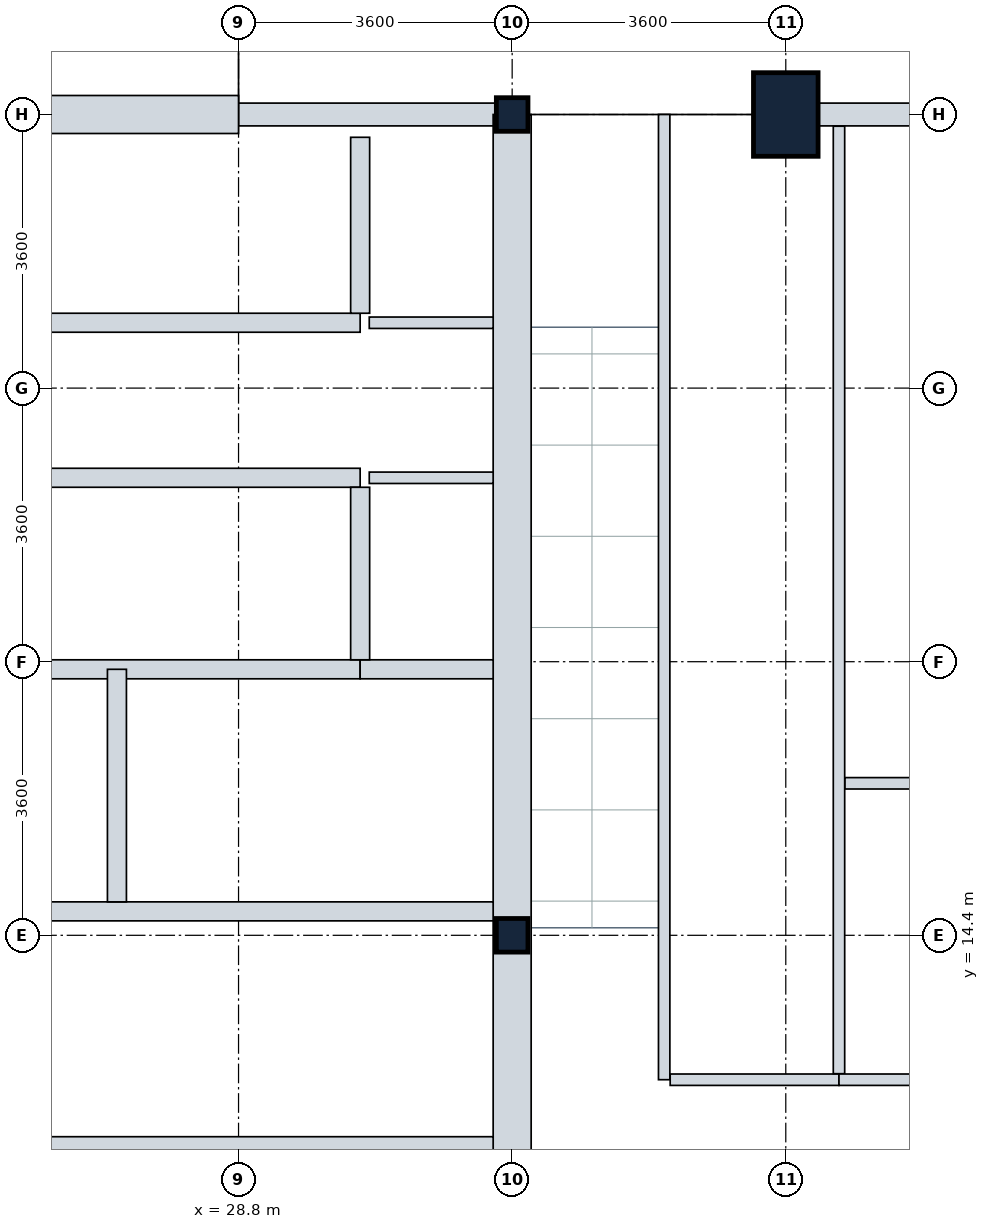
"""IFC4 building model, lengths in metres.
Left out: names, types, materials, properties, quantities, classifications, styles, units other than length and angle.
Written with IfcOpenShell. Run it as: python <this file> out.ifc"""

import sys

from ifc_helpers import new_model, si_unit, direction, frame, frame_2d, origin, origin_2d, place, context, subcontext, project, spatial, rectangle, i_section, extrude, element, fill, save


model = new_model("IFC4")
c1 = context("Model", 3, precision=1e-05, world=origin(), true_north=direction((0.0, 1.0)))
c2 = subcontext(c1, "Body", "Model", "MODEL_VIEW")
j1 = project(units=[si_unit("LENGTHUNIT", "METRE"), si_unit("PLANEANGLEUNIT", "RADIAN")], contexts=[c1])
p1 = place(None, origin())
s1 = spatial("IfcSite", under=j1, at=p1, CompositionType="ELEMENT")
p2 = place(p1, origin())
s2 = spatial("IfcBuilding", under=s1, at=p2, CompositionType="ELEMENT")
p3 = place(p2, frame((0.0, 0.0, 115.2)))
s3 = spatial("IfcBuildingStorey", under=s2, at=p3, CompositionType="ELEMENT", Elevation=115.2)
for number, where, z_axis, x_axis in (
    (1, (32.4, 14.4, 0.0), (0.0, 0.0, 1.0), (1.0, 0.0, 0.0)),
    (2, (32.4, 25.2, 0.0), (0.0, 0.0, 1.0), (1.0, 0.0, 0.0)),
):
    element("IfcColumn", number, at=place(p3, frame(where, z_axis=z_axis, x_axis=x_axis)), inside=s3, PredefinedType="COLUMN", context=c2, shape_type="SweptSolid", body=[
        extrude(i_section(OverallWidth=0.416, OverallDepth=0.442, WebThickness=0.025, FlangeThickness=0.041, FilletRadius=0.015, at=origin_2d()), origin(), (0.0, 0.0, 1.0), 4.8),
    ])
p4 = place(p3, frame((36.0, 25.2, 0.0), z_axis=(0.0, 0.0, 1.0), x_axis=(1.0, 0.0, 0.0)))
e3 = element("IfcColumn", 3, at=p4, inside=s3, PredefinedType="COLUMN", context=c2, shape_type="SweptSolid", body=[
    extrude(rectangle(XDim=0.85, YDim=1.1, at=origin_2d()), origin(), (0.0, 0.0, 1.0), 4.8),
])
p5 = place(p3, frame((36.0, 25.2, 0.0), z_axis=(0.0, 0.0, 1.0), x_axis=(1.0, 0.0, 0.0)))
e4 = element("IfcWall", 4, at=p5, inside=s3, PredefinedType="STANDARD", context=c2, shape_type="SweptSolid", body=[
    extrude(rectangle(XDim=3.6, YDim=0.3, at=frame_2d((1.8, 0.0))), origin(), (0.0, 0.0, 1.0), 3.93),
])
p6 = place(p3, frame((28.8, 25.2, 0.0), z_axis=(0.0, 0.0, 1.0), x_axis=(1.0, 0.0, 0.0)))
e5 = element("IfcWall", 5, at=p6, inside=s3, PredefinedType="STANDARD", context=c2, shape_type="SweptSolid", body=[
    extrude(rectangle(XDim=3.6, YDim=0.3, at=frame_2d((1.8, 0.0))), origin(), (0.0, 0.0, 1.0), 4.535),
])
p7 = place(p6, frame((0.728, 0.0, 0.85)))
e6 = element("IfcOpeningElement", 6, at=p7, cuts=e5, PredefinedType="OPENING", context=c2, shape_type="SweptSolid", body=[
    extrude(rectangle(XDim=2.1, YDim=1.35, at=frame_2d((1.05, 0.675))), frame((0.0, 0.16, 0.0), z_axis=(0.0, -1.0, 0.0), x_axis=(1.0, 0.0, 0.0)), (0.0, 0.0, 1.0), 0.32),
])
p8 = place(p3, frame((14.4, 25.2, 0.0), z_axis=(0.0, 0.0, 1.0), x_axis=(1.0, 0.0, 0.0)))
e7 = element("IfcWall", 7, at=p8, inside=s3, PredefinedType="SHEAR", context=c2, shape_type="SweptSolid", body=[
    extrude(rectangle(XDim=14.4, YDim=0.5, at=frame_2d((7.2, 0.0))), origin(), (0.0, 0.0, 1.0), 4.55),
])
p9 = place(p3, frame((32.4, 10.8, 0.0), z_axis=(0.0, 0.0, 1.0), x_axis=(0.0, 1.0, 0.0)))
e8 = element("IfcWall", 8, at=p9, inside=s3, PredefinedType="SHEAR", context=c2, shape_type="SweptSolid", body=[
    extrude(rectangle(XDim=14.4, YDim=0.5, at=frame_2d((7.2, 0.0))), origin(), (0.0, 0.0, 1.0), 4.55),
])
p10 = place(p9, frame((4.35, 0.0, 0.0)))
e9 = element("IfcOpeningElement", 9, at=p10, cuts=e8, PredefinedType="OPENING", context=c2, shape_type="SweptSolid", body=[
    extrude(rectangle(XDim=1.2, YDim=2.1, at=frame_2d((0.6, 1.05))), frame((0.0, 0.26, 0.0), z_axis=(0.0, -1.0, 0.0), x_axis=(1.0, 0.0, 0.0)), (0.0, 0.0, 1.0), 0.52),
])
p11 = place(p9, frame((10.0, 0.0, 0.0)))
e10 = element("IfcOpeningElement", 10, at=p11, cuts=e8, PredefinedType="OPENING", context=c2, shape_type="SweptSolid", body=[
    extrude(rectangle(XDim=1.2, YDim=2.1, at=frame_2d((0.6, 1.05))), frame((0.0, 0.26, 0.0), z_axis=(0.0, -1.0, 0.0), x_axis=(1.0, 0.0, 0.0)), (0.0, 0.0, 1.0), 0.52),
])
p12 = place(p3, frame((23.35, 11.625, 0.0), z_axis=(0.0, 0.0, 1.0), x_axis=(1.0, 0.0, 0.0)))
e11 = element("IfcWall", 11, at=p12, inside=s3, PredefinedType="SHEAR", context=c2, shape_type="SweptSolid", body=[
    extrude(rectangle(XDim=8.8, YDim=0.25, at=frame_2d((4.4, 0.0))), origin(), (0.0, 0.0, 1.0), 4.55),
])
p13 = place(p3, frame((23.35, 14.715, 0.0), z_axis=(0.0, 0.0, 1.0), x_axis=(1.0, 0.0, 0.0)))
e12 = element("IfcWall", 12, at=p13, inside=s3, PredefinedType="SHEAR", context=c2, shape_type="SweptSolid", body=[
    extrude(rectangle(XDim=8.8, YDim=0.25, at=frame_2d((4.4, 0.0))), origin(), (0.0, 0.0, 1.0), 4.55),
])
p14 = place(p13, frame((6.775, 0.0, 0.0)))
e13 = element("IfcOpeningElement", 13, at=p14, cuts=e12, PredefinedType="OPENING", context=c2, shape_type="SweptSolid", body=[
    extrude(rectangle(XDim=1.1, YDim=2.1, at=frame_2d((0.55, 1.05))), frame((0.0, 0.135, 0.0), z_axis=(0.0, -1.0, 0.0), x_axis=(1.0, 0.0, 0.0)), (0.0, 0.0, 1.0), 0.27),
])
p15 = place(p3, frame((21.88, 17.9, 0.0), z_axis=(0.0, 0.0, 1.0), x_axis=(1.0, 0.0, 0.0)))
e14 = element("IfcWall", 14, at=p15, inside=s3, PredefinedType="PARTITIONING", context=c2, shape_type="SweptSolid", body=[
    extrude(rectangle(XDim=8.52, YDim=0.25, at=frame_2d((4.26, 0.0))), origin(), (0.0, 0.0, 1.0), 4.535),
])
p16 = place(p3, frame((30.4, 17.9, 0.0), z_axis=(0.0, 0.0, 1.0), x_axis=(1.0, 0.0, 0.0)))
e15 = element("IfcWall", 15, at=p16, inside=s3, PredefinedType="PARTITIONING", context=c2, shape_type="SweptSolid", body=[
    extrude(rectangle(XDim=1.75, YDim=0.25, at=frame_2d((0.875, 0.0))), origin(), (0.0, 0.0, 1.0), 4.535),
])
p17 = place(p16, frame((0.32, 0.0, 0.0)))
e16 = element("IfcOpeningElement", 16, at=p17, cuts=e15, PredefinedType="OPENING", context=c2, shape_type="SweptSolid", body=[
    extrude(rectangle(XDim=1.1, YDim=2.1, at=frame_2d((0.55, 1.05))), frame((0.0, 0.135, 0.0), z_axis=(0.0, -1.0, 0.0), x_axis=(1.0, 0.0, 0.0)), (0.0, 0.0, 1.0), 0.27),
])
p18 = place(p3, frame((27.2, 14.84, 0.0), z_axis=(0.0, 0.0, 1.0), x_axis=(0.0, 1.0, 0.0)))
e17 = element("IfcWall", 17, at=p18, inside=s3, PredefinedType="PARTITIONING", context=c2, shape_type="SweptSolid", body=[
    extrude(rectangle(XDim=3.06, YDim=0.25, at=frame_2d((1.53, 0.0))), origin(), (0.0, 0.0, 1.0), 4.535),
])
p19 = place(p18, frame((0.98, 0.0, 0.0)))
e18 = element("IfcOpeningElement", 18, at=p19, cuts=e17, PredefinedType="OPENING", context=c2, shape_type="SweptSolid", body=[
    extrude(rectangle(XDim=1.1, YDim=2.1, at=frame_2d((0.55, 1.05))), frame((0.0, 0.135, 0.0), z_axis=(0.0, -1.0, 0.0), x_axis=(1.0, 0.0, 0.0)), (0.0, 0.0, 1.0), 0.27),
])
p20 = place(p3, frame((23.18, 20.42, 0.0), z_axis=(0.0, 0.0, 1.0), x_axis=(1.0, 0.0, 0.0)))
e19 = element("IfcWall", 19, at=p20, inside=s3, PredefinedType="PARTITIONING", context=c2, shape_type="SweptSolid", body=[
    extrude(rectangle(XDim=7.22, YDim=0.25, at=frame_2d((3.61, 0.0))), origin(), (0.0, 0.0, 1.0), 4.535),
])
p21 = place(p20, frame((0.41, 0.0, 0.0)))
e20 = element("IfcOpeningElement", 20, at=p21, cuts=e19, PredefinedType="OPENING", context=c2, shape_type="SweptSolid", body=[
    extrude(rectangle(XDim=1.1, YDim=2.1, at=frame_2d((0.55, 1.05))), frame((0.0, 0.135, 0.0), z_axis=(0.0, -1.0, 0.0), x_axis=(1.0, 0.0, 0.0)), (0.0, 0.0, 1.0), 0.27),
])
p22 = place(p20, frame((2.19, 0.0, 0.0)))
e21 = element("IfcOpeningElement", 21, at=p22, cuts=e19, PredefinedType="OPENING", context=c2, shape_type="SweptSolid", body=[
    extrude(rectangle(XDim=1.1, YDim=2.1, at=frame_2d((0.55, 1.05))), frame((0.0, 0.135, 0.0), z_axis=(0.0, -1.0, 0.0), x_axis=(1.0, 0.0, 0.0)), (0.0, 0.0, 1.0), 0.27),
])
p23 = place(p20, frame((3.97, 0.0, 0.0)))
e22 = element("IfcOpeningElement", 22, at=p23, cuts=e19, PredefinedType="OPENING", context=c2, shape_type="SweptSolid", body=[
    extrude(rectangle(XDim=1.1, YDim=2.1, at=frame_2d((0.55, 1.05))), frame((0.0, 0.135, 0.0), z_axis=(0.0, -1.0, 0.0), x_axis=(1.0, 0.0, 0.0)), (0.0, 0.0, 1.0), 0.27),
])
p24 = place(p20, frame((5.75, 0.0, 0.0)))
e23 = element("IfcOpeningElement", 23, at=p24, cuts=e19, PredefinedType="OPENING", context=c2, shape_type="SweptSolid", body=[
    extrude(rectangle(XDim=1.1, YDim=2.1, at=frame_2d((0.55, 1.05))), frame((0.0, 0.135, 0.0), z_axis=(0.0, -1.0, 0.0), x_axis=(1.0, 0.0, 0.0)), (0.0, 0.0, 1.0), 0.27),
])
p25 = place(p3, frame((30.4, 18.025, 0.0), z_axis=(0.0, 0.0, 1.0), x_axis=(0.0, 1.0, 0.0)))
e24 = element("IfcWall", 24, at=p25, inside=s3, PredefinedType="PARTITIONING", context=c2, shape_type="SweptSolid", body=[
    extrude(rectangle(XDim=2.27, YDim=0.25, at=frame_2d((1.135, 0.0))), origin(), (0.0, 0.0, 1.0), 4.535),
])
p26 = place(p3, frame((23.18, 22.46, 0.0), z_axis=(0.0, 0.0, 1.0), x_axis=(1.0, 0.0, 0.0)))
e25 = element("IfcWall", 25, at=p26, inside=s3, PredefinedType="PARTITIONING", context=c2, shape_type="SweptSolid", body=[
    extrude(rectangle(XDim=7.22, YDim=0.25, at=frame_2d((3.61, 0.0))), origin(), (0.0, 0.0, 1.0), 4.535),
])
p27 = place(p26, frame((0.41, 0.0, 0.0)))
e26 = element("IfcOpeningElement", 26, at=p27, cuts=e25, PredefinedType="OPENING", context=c2, shape_type="SweptSolid", body=[
    extrude(rectangle(XDim=1.1, YDim=2.1, at=frame_2d((0.55, 1.05))), frame((0.0, 0.135, 0.0), z_axis=(0.0, -1.0, 0.0), x_axis=(1.0, 0.0, 0.0)), (0.0, 0.0, 1.0), 0.27),
])
p28 = place(p26, frame((2.19, 0.0, 0.0)))
e27 = element("IfcOpeningElement", 27, at=p28, cuts=e25, PredefinedType="OPENING", context=c2, shape_type="SweptSolid", body=[
    extrude(rectangle(XDim=1.1, YDim=2.1, at=frame_2d((0.55, 1.05))), frame((0.0, 0.135, 0.0), z_axis=(0.0, -1.0, 0.0), x_axis=(1.0, 0.0, 0.0)), (0.0, 0.0, 1.0), 0.27),
])
p29 = place(p26, frame((3.97, 0.0, 0.0)))
e28 = element("IfcOpeningElement", 28, at=p29, cuts=e25, PredefinedType="OPENING", context=c2, shape_type="SweptSolid", body=[
    extrude(rectangle(XDim=1.1, YDim=2.1, at=frame_2d((0.55, 1.05))), frame((0.0, 0.135, 0.0), z_axis=(0.0, -1.0, 0.0), x_axis=(1.0, 0.0, 0.0)), (0.0, 0.0, 1.0), 0.27),
])
p30 = place(p26, frame((5.75, 0.0, 0.0)))
e29 = element("IfcOpeningElement", 29, at=p30, cuts=e25, PredefinedType="OPENING", context=c2, shape_type="SweptSolid", body=[
    extrude(rectangle(XDim=1.1, YDim=2.1, at=frame_2d((0.55, 1.05))), frame((0.0, 0.135, 0.0), z_axis=(0.0, -1.0, 0.0), x_axis=(1.0, 0.0, 0.0)), (0.0, 0.0, 1.0), 0.27),
])
p31 = place(p3, frame((30.4, 22.585, 0.0), z_axis=(0.0, 0.0, 1.0), x_axis=(0.0, 1.0, 0.0)))
e30 = element("IfcWall", 30, at=p31, inside=s3, PredefinedType="PARTITIONING", context=c2, shape_type="SweptSolid", body=[
    extrude(rectangle(XDim=2.315, YDim=0.25, at=frame_2d((1.157, 0.0))), origin(), (0.0, 0.0, 1.0), 4.535),
])
p32 = place(p3, frame((30.52, 22.46, 0.0), z_axis=(0.0, 0.0, 1.0), x_axis=(1.0, 0.0, 0.0)))
e31 = element("IfcWall", 31, at=p32, inside=s3, PredefinedType="PARTITIONING", context=c2, shape_type="SweptSolid", body=[
    extrude(rectangle(XDim=1.63, YDim=0.15, at=frame_2d((0.815, 0.0))), origin(), (0.0, 0.0, 1.0), 4.535),
])
p33 = place(p32, frame((0.38, 0.0, 0.0)))
e32 = element("IfcOpeningElement", 32, at=p33, cuts=e31, PredefinedType="OPENING", context=c2, shape_type="SweptSolid", body=[
    extrude(rectangle(XDim=0.85, YDim=2.1, at=frame_2d((0.425, 1.05))), frame((0.0, 0.085, 0.0), z_axis=(0.0, -1.0, 0.0), x_axis=(1.0, 0.0, 0.0)), (0.0, 0.0, 1.0), 0.17),
])
p34 = place(p3, frame((30.52, 20.42, 0.0), z_axis=(0.0, 0.0, 1.0), x_axis=(1.0, 0.0, 0.0)))
e33 = element("IfcWall", 33, at=p34, inside=s3, PredefinedType="PARTITIONING", context=c2, shape_type="SweptSolid", body=[
    extrude(rectangle(XDim=1.63, YDim=0.15, at=frame_2d((0.815, 0.0))), origin(), (0.0, 0.0, 1.0), 4.535),
])
p35 = place(p34, frame((0.38, 0.0, 0.0)))
e34 = element("IfcOpeningElement", 34, at=p35, cuts=e33, PredefinedType="OPENING", context=c2, shape_type="SweptSolid", body=[
    extrude(rectangle(XDim=0.85, YDim=2.1, at=frame_2d((0.425, 1.05))), frame((0.0, 0.085, 0.0), z_axis=(0.0, -1.0, 0.0), x_axis=(1.0, 0.0, 0.0)), (0.0, 0.0, 1.0), 0.17),
])
p36 = place(p3, frame((34.4, 12.5, 0.0), z_axis=(0.0, 0.0, 1.0), x_axis=(0.0, 1.0, 0.0)))
e35 = element("IfcWall", 35, at=p36, inside=s3, PredefinedType="PARTITIONING", context=c2, shape_type="SweptSolid", body=[
    extrude(rectangle(XDim=12.7, YDim=0.15, at=frame_2d((6.35, 0.0))), origin(), (0.0, 0.0, 1.0), 3.93),
])
p37 = place(p3, frame((34.479, 12.5, 0.0), z_axis=(0.0, 0.0, 1.0), x_axis=(1.0, 0.0, 0.0)))
e36 = element("IfcWall", 36, at=p37, inside=s3, PredefinedType="PARTITIONING", context=c2, shape_type="SweptSolid", body=[
    extrude(rectangle(XDim=2.221, YDim=0.15, at=frame_2d((1.11, 0.0))), origin(), (0.0, 0.0, 1.0), 4.08),
])
p38 = place(p37, frame((0.674, 0.0, 0.0)))
e37 = element("IfcOpeningElement", 37, at=p38, cuts=e36, PredefinedType="OPENING", context=c2, shape_type="SweptSolid", body=[
    extrude(rectangle(XDim=0.85, YDim=2.1, at=frame_2d((0.425, 1.05))), frame((0.0, 0.085, 0.0), z_axis=(0.0, -1.0, 0.0), x_axis=(1.0, 0.0, 0.0)), (0.0, 0.0, 1.0), 0.17),
])
p39 = place(p3, frame((36.7, 12.579, 0.0), z_axis=(0.0, 0.0, 1.0), x_axis=(0.0, 1.0, 0.0)))
e38 = element("IfcWall", 38, at=p39, inside=s3, PredefinedType="PARTITIONING", context=c2, shape_type="SweptSolid", body=[
    extrude(rectangle(XDim=12.467, YDim=0.15, at=frame_2d((6.233, 0.0))), origin(), (0.0, 0.0, 1.0), 3.93),
])
p40 = place(p3, frame((36.7, 12.5, 0.0), z_axis=(0.0, 0.0, 1.0), x_axis=(1.0, 0.0, 0.0)))
e39 = element("IfcWall", 39, at=p40, inside=s3, PredefinedType="PARTITIONING", context=c2, shape_type="SweptSolid", body=[
    extrude(rectangle(XDim=2.3, YDim=0.15, at=frame_2d((1.15, 0.0))), origin(), (0.0, 0.0, 1.0), 4.535),
])
p41 = place(p40, frame((0.697, 0.0, 0.0)))
e40 = element("IfcOpeningElement", 40, at=p41, cuts=e39, PredefinedType="OPENING", context=c2, shape_type="SweptSolid", body=[
    extrude(rectangle(XDim=0.85, YDim=2.1, at=frame_2d((0.425, 1.05))), frame((0.0, 0.085, 0.0), z_axis=(0.0, -1.0, 0.0), x_axis=(1.0, 0.0, 0.0)), (0.0, 0.0, 1.0), 0.17),
])
p42 = place(p3, frame((36.779, 16.4, 0.0), z_axis=(0.0, 0.0, 1.0), x_axis=(1.0, 0.0, 0.0)))
e41 = element("IfcWall", 41, at=p42, inside=s3, PredefinedType="PARTITIONING", context=c2, shape_type="SweptSolid", body=[
    extrude(rectangle(XDim=2.142, YDim=0.15, at=frame_2d((1.071, 0.0))), origin(), (0.0, 0.0, 1.0), 4.535),
])
p43 = place(p7, origin())
e42 = element("IfcWindow", 42, at=p43, inside=s3, PartitioningType="SINGLE_PANEL", PredefinedType="WINDOW", context=c2, shape_type="SweptSolid", body=[
    extrude(rectangle(XDim=2.1, YDim=1.35, at=frame_2d((1.05, 0.675))), frame((0.0, 0.03, 0.0), z_axis=(0.0, -1.0, 0.0), x_axis=(1.0, 0.0, 0.0)), (0.0, 0.0, 1.0), 0.06),
])
fill(e6, e42)
p44 = place(p14, origin())
e43 = element("IfcDoor", 43, at=p44, inside=s3, OperationType="SINGLE_SWING_LEFT", PredefinedType="DOOR", context=c2, shape_type="SweptSolid", body=[
    extrude(rectangle(XDim=1.1, YDim=2.1, at=frame_2d((0.55, 1.05))), frame((0.0, 0.025, 0.0), z_axis=(0.0, -1.0, 0.0), x_axis=(1.0, 0.0, 0.0)), (0.0, 0.0, 1.0), 0.05),
])
fill(e13, e43)
p45 = place(p19, origin())
e44 = element("IfcDoor", 44, at=p45, inside=s3, OperationType="SLIDING_TO_LEFT", PredefinedType="DOOR", context=c2, shape_type="SweptSolid", body=[
    extrude(rectangle(XDim=1.1, YDim=2.1, at=frame_2d((0.55, 1.05))), frame((0.0, 0.025, 0.0), z_axis=(0.0, -1.0, 0.0), x_axis=(1.0, 0.0, 0.0)), (0.0, 0.0, 1.0), 0.05),
])
fill(e18, e44)
p46 = place(p10, origin())
e45 = element("IfcDoor", 45, at=p46, inside=s3, OperationType="SINGLE_SWING_LEFT", PredefinedType="DOOR", context=c2, shape_type="SweptSolid", body=[
    extrude(rectangle(XDim=1.2, YDim=2.1, at=frame_2d((0.6, 1.05))), frame((0.0, 0.025, 0.0), z_axis=(0.0, -1.0, 0.0), x_axis=(1.0, 0.0, 0.0)), (0.0, 0.0, 1.0), 0.05),
])
fill(e9, e45)
p47 = place(p17, origin())
e46 = element("IfcDoor", 46, at=p47, inside=s3, OperationType="SINGLE_SWING_LEFT", PredefinedType="DOOR", context=c2, shape_type="SweptSolid", body=[
    extrude(rectangle(XDim=1.1, YDim=2.1, at=frame_2d((0.55, 1.05))), frame((0.0, 0.025, 0.0), z_axis=(0.0, -1.0, 0.0), x_axis=(1.0, 0.0, 0.0)), (0.0, 0.0, 1.0), 0.05),
])
fill(e16, e46)
p48 = place(p22, origin())
e47 = element("IfcDoor", 47, at=p48, inside=s3, OperationType="SLIDING_TO_LEFT", PredefinedType="DOOR", context=c2, shape_type="SweptSolid", body=[
    extrude(rectangle(XDim=1.1, YDim=2.1, at=frame_2d((0.55, 1.05))), frame((0.0, 0.025, 0.0), z_axis=(0.0, -1.0, 0.0), x_axis=(1.0, 0.0, 0.0)), (0.0, 0.0, 1.0), 0.05),
])
fill(e21, e47)
p49 = place(p23, origin())
e48 = element("IfcDoor", 48, at=p49, inside=s3, OperationType="SLIDING_TO_LEFT", PredefinedType="DOOR", context=c2, shape_type="SweptSolid", body=[
    extrude(rectangle(XDim=1.1, YDim=2.1, at=frame_2d((0.55, 1.05))), frame((0.0, 0.025, 0.0), z_axis=(0.0, -1.0, 0.0), x_axis=(1.0, 0.0, 0.0)), (0.0, 0.0, 1.0), 0.05),
])
fill(e22, e48)
p50 = place(p24, origin())
e49 = element("IfcDoor", 49, at=p50, inside=s3, OperationType="SLIDING_TO_LEFT", PredefinedType="DOOR", context=c2, shape_type="SweptSolid", body=[
    extrude(rectangle(XDim=1.1, YDim=2.1, at=frame_2d((0.55, 1.05))), frame((0.0, 0.025, 0.0), z_axis=(0.0, -1.0, 0.0), x_axis=(1.0, 0.0, 0.0)), (0.0, 0.0, 1.0), 0.05),
])
fill(e23, e49)
p51 = place(p28, origin())
e50 = element("IfcDoor", 50, at=p51, inside=s3, OperationType="SLIDING_TO_LEFT", PredefinedType="DOOR", context=c2, shape_type="SweptSolid", body=[
    extrude(rectangle(XDim=1.1, YDim=2.1, at=frame_2d((0.55, 1.05))), frame((0.0, 0.025, 0.0), z_axis=(0.0, -1.0, 0.0), x_axis=(1.0, 0.0, 0.0)), (0.0, 0.0, 1.0), 0.05),
])
fill(e27, e50)
p52 = place(p29, origin())
e51 = element("IfcDoor", 51, at=p52, inside=s3, OperationType="SLIDING_TO_LEFT", PredefinedType="DOOR", context=c2, shape_type="SweptSolid", body=[
    extrude(rectangle(XDim=1.1, YDim=2.1, at=frame_2d((0.55, 1.05))), frame((0.0, 0.025, 0.0), z_axis=(0.0, -1.0, 0.0), x_axis=(1.0, 0.0, 0.0)), (0.0, 0.0, 1.0), 0.05),
])
fill(e28, e51)
p53 = place(p30, origin())
e52 = element("IfcDoor", 52, at=p53, inside=s3, OperationType="SLIDING_TO_LEFT", PredefinedType="DOOR", context=c2, shape_type="SweptSolid", body=[
    extrude(rectangle(XDim=1.1, YDim=2.1, at=frame_2d((0.55, 1.05))), frame((0.0, 0.025, 0.0), z_axis=(0.0, -1.0, 0.0), x_axis=(1.0, 0.0, 0.0)), (0.0, 0.0, 1.0), 0.05),
])
fill(e29, e52)
p54 = place(p11, origin())
e53 = element("IfcDoor", 53, at=p54, inside=s3, OperationType="SINGLE_SWING_RIGHT", PredefinedType="DOOR", context=c2, shape_type="SweptSolid", body=[
    extrude(rectangle(XDim=1.2, YDim=2.1, at=frame_2d((0.6, 1.05))), frame((0.0, 0.025, 0.0), z_axis=(0.0, -1.0, 0.0), x_axis=(1.0, 0.0, 0.0)), (0.0, 0.0, 1.0), 0.05),
])
fill(e10, e53)
p55 = place(p33, origin())
e54 = element("IfcDoor", 54, at=p55, inside=s3, OperationType="SINGLE_SWING_RIGHT", PredefinedType="DOOR", context=c2, shape_type="SweptSolid", body=[
    extrude(rectangle(XDim=0.85, YDim=2.1, at=frame_2d((0.425, 1.05))), frame((0.0, 0.025, 0.0), z_axis=(0.0, -1.0, 0.0), x_axis=(1.0, 0.0, 0.0)), (0.0, 0.0, 1.0), 0.05),
])
fill(e32, e54)
p56 = place(p35, origin())
e55 = element("IfcDoor", 55, at=p56, inside=s3, OperationType="SINGLE_SWING_LEFT", PredefinedType="DOOR", context=c2, shape_type="SweptSolid", body=[
    extrude(rectangle(XDim=0.85, YDim=2.1, at=frame_2d((0.425, 1.05))), frame((0.0, 0.025, 0.0), z_axis=(0.0, -1.0, 0.0), x_axis=(1.0, 0.0, 0.0)), (0.0, 0.0, 1.0), 0.05),
])
fill(e34, e55)
p57 = place(p38, origin())
e56 = element("IfcDoor", 56, at=p57, inside=s3, OperationType="SINGLE_SWING_RIGHT", PredefinedType="DOOR", context=c2, shape_type="SweptSolid", body=[
    extrude(rectangle(XDim=0.85, YDim=2.1, at=frame_2d((0.425, 1.05))), frame((0.0, 0.025, 0.0), z_axis=(0.0, -1.0, 0.0), x_axis=(1.0, 0.0, 0.0)), (0.0, 0.0, 1.0), 0.05),
])
fill(e37, e56)
p58 = place(p41, origin())
e57 = element("IfcDoor", 57, at=p58, inside=s3, OperationType="SINGLE_SWING_RIGHT", PredefinedType="DOOR", context=c2, shape_type="SweptSolid", body=[
    extrude(rectangle(XDim=0.85, YDim=2.1, at=frame_2d((0.425, 1.05))), frame((0.0, 0.025, 0.0), z_axis=(0.0, -1.0, 0.0), x_axis=(1.0, 0.0, 0.0)), (0.0, 0.0, 1.0), 0.05),
])
fill(e40, e57)
save(model, sys.argv[1])
